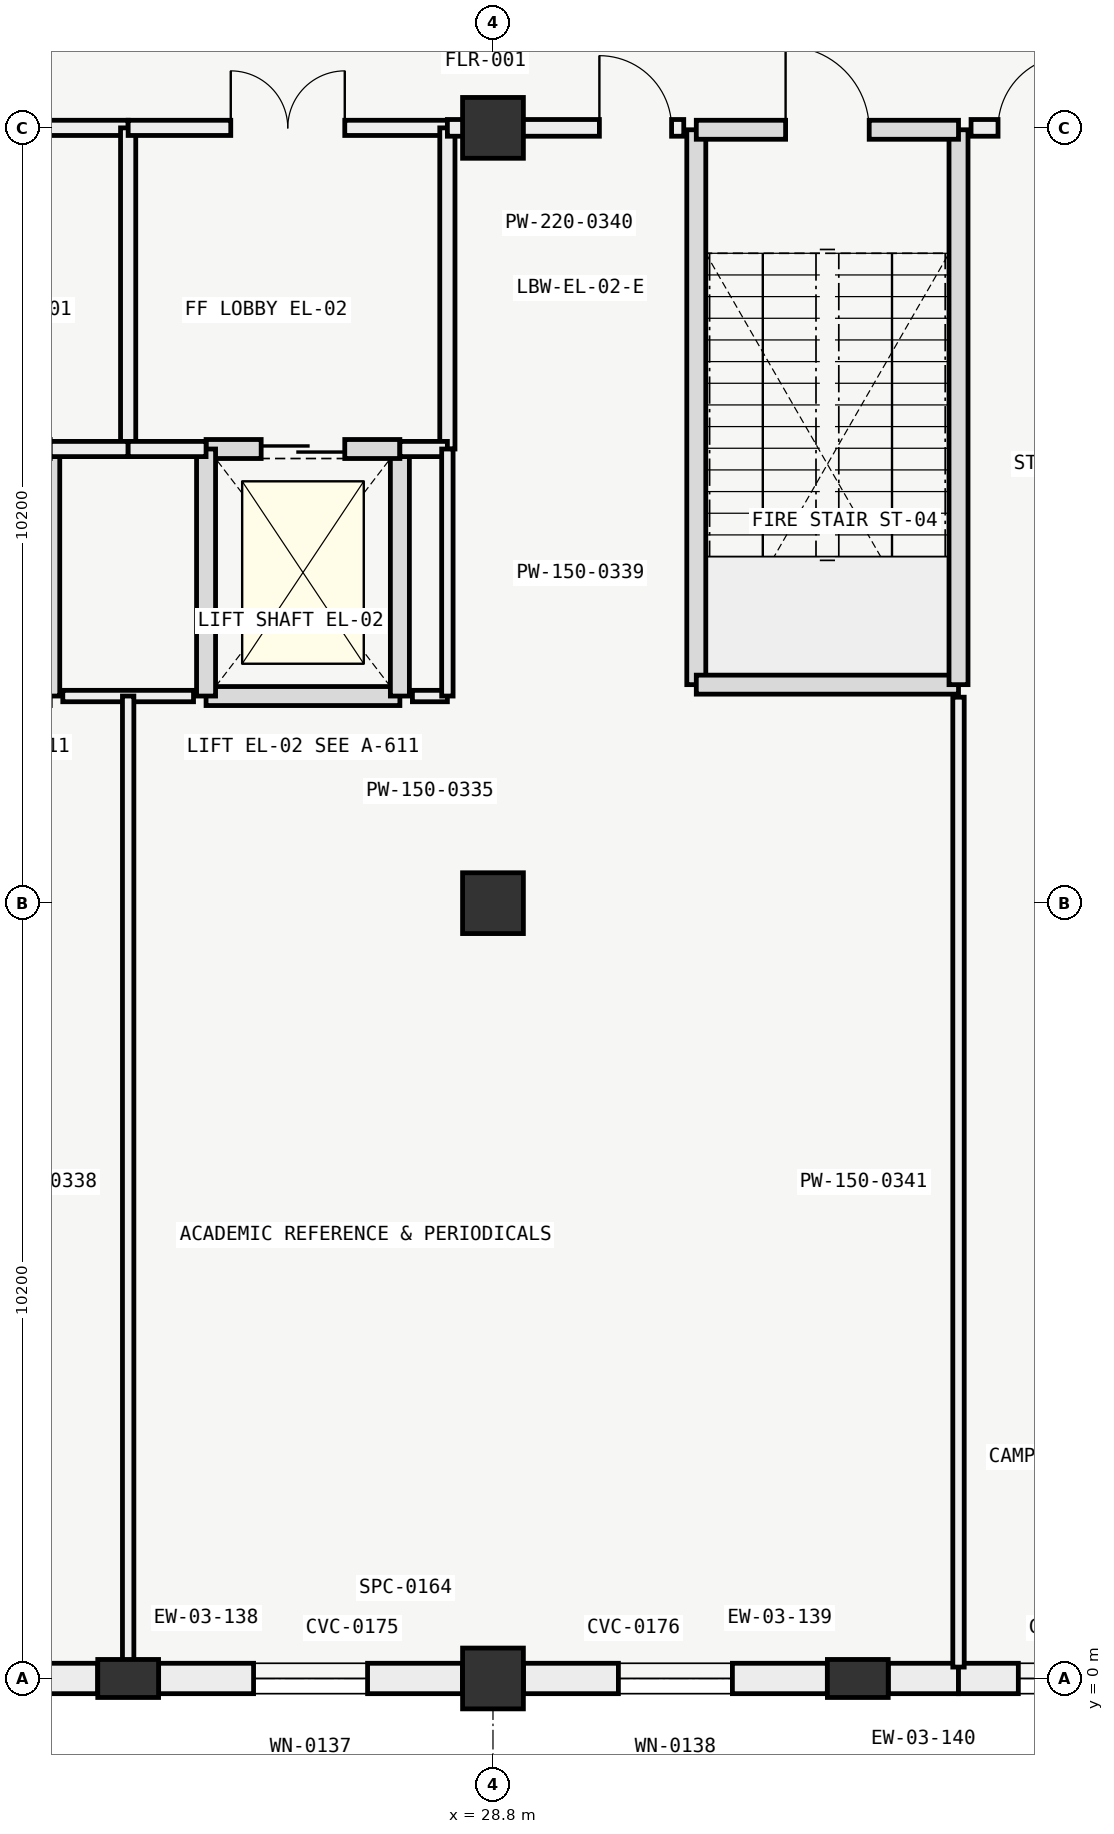
"""IFC4 building model, lengths in metres.
Left out: names, types, materials, properties, quantities, classifications, styles, units other than length and angle.
Written with IfcOpenShell. Run it as: python <this file> out.ifc"""

import sys

from ifc_helpers import new_model, si_unit, direction, frame, frame_2d, origin, origin_2d, place, context, subcontext, project, spatial, rectangle, extrude, element, fill, save


model = new_model("IFC4")
c1 = context("Model", 3, precision=1e-05, world=origin(), true_north=direction((0.0, 1.0)))
c2 = subcontext(c1, "Body", "Model", "MODEL_VIEW")
j1 = project(units=[si_unit("LENGTHUNIT", "METRE"), si_unit("PLANEANGLEUNIT", "RADIAN")], contexts=[c1])
p1 = place(None, origin())
s1 = spatial("IfcSite", under=j1, at=p1, CompositionType="ELEMENT")
p2 = place(p1, origin())
s2 = spatial("IfcBuilding", under=s1, at=p2, CompositionType="ELEMENT")
p3 = place(p2, origin())
s3 = spatial("IfcBuildingStorey", under=s2, at=p3, CompositionType="ELEMENT", Elevation=0.0)
for number, where, z_axis, x_axis in (
    (1, (28.8, 0.0, 0.0), (0.0, 0.0, 1.0), (1.0, 0.0, 0.0)),
    (2, (28.8, 10.2, 0.0), (0.0, 0.0, 1.0), (1.0, 0.0, 0.0)),
    (3, (28.8, 20.4, 0.0), (0.0, 0.0, 1.0), (1.0, 0.0, 0.0)),
):
    element("IfcColumn", number, at=place(p3, frame(where, z_axis=z_axis, x_axis=x_axis)), inside=s3, PredefinedType="COLUMN", context=c2, shape_type="SweptSolid", body=[
        extrude(rectangle(XDim=0.8, YDim=0.8, at=origin_2d()), origin(), (0.0, 0.0, 1.0), 5.4),
    ])
for number, where, z_axis, x_axis in (
    (4, (24.0, 0.0, 0.0), (0.0, 0.0, 1.0), (0.0, 1.0, 0.0)),
    (5, (33.6, 0.0, 0.0), (0.0, 0.0, 1.0), (0.0, 1.0, 0.0)),
):
    element("IfcColumn", number, at=place(p3, frame(where, z_axis=z_axis, x_axis=x_axis)), inside=s3, PredefinedType="PILASTER", context=c2, shape_type="SweptSolid", body=[
        extrude(rectangle(XDim=0.5, YDim=0.8, at=origin_2d()), origin(), (0.0, 0.0, 1.0), 5.4),
    ])
p4 = place(p3, frame((23.599, 0.0, 0.0), z_axis=(0.0, 0.0, 1.0), x_axis=(-1.0, 0.0, 0.0)))
e6 = element("IfcWall", 6, at=p4, inside=s3, PredefinedType="SOLIDWALL", context=c2, shape_type="SweptSolid", body=[
    extrude(rectangle(XDim=3.998, YDim=0.4, at=frame_2d((1.999, 0.0))), origin(), (0.0, 0.0, 1.0), 3.63),
])
p5 = place(p4, frame((1.249, 0.0, 0.8)))
e7 = element("IfcOpeningElement", 7, at=p5, cuts=e6, PredefinedType="OPENING", context=c2, shape_type="SweptSolid", body=[
    extrude(rectangle(XDim=1.5, YDim=2.6, at=frame_2d((0.75, 1.3))), frame((0.0, 0.21, 0.0), z_axis=(0.0, -1.0, 0.0), x_axis=(1.0, 0.0, 0.0)), (0.0, 0.0, 1.0), 0.42),
])
p6 = place(p3, frame((28.399, 0.0, 0.0), z_axis=(0.0, 0.0, 1.0), x_axis=(-1.0, 0.0, 0.0)))
e8 = element("IfcWall", 8, at=p6, inside=s3, PredefinedType="SOLIDWALL", context=c2, shape_type="SweptSolid", body=[
    extrude(rectangle(XDim=3.998, YDim=0.4, at=frame_2d((1.999, 0.0))), origin(), (0.0, 0.0, 1.0), 3.63),
])
p7 = place(p6, frame((1.249, 0.0, 0.8)))
e9 = element("IfcOpeningElement", 9, at=p7, cuts=e8, PredefinedType="OPENING", context=c2, shape_type="SweptSolid", body=[
    extrude(rectangle(XDim=1.5, YDim=2.6, at=frame_2d((0.75, 1.3))), frame((0.0, 0.21, 0.0), z_axis=(0.0, -1.0, 0.0), x_axis=(1.0, 0.0, 0.0)), (0.0, 0.0, 1.0), 0.42),
])
p8 = place(p3, frame((33.199, 0.0, 0.0), z_axis=(0.0, 0.0, 1.0), x_axis=(-1.0, 0.0, 0.0)))
e10 = element("IfcWall", 10, at=p8, inside=s3, PredefinedType="SOLIDWALL", context=c2, shape_type="SweptSolid", body=[
    extrude(rectangle(XDim=3.998, YDim=0.4, at=frame_2d((1.999, 0.0))), origin(), (0.0, 0.0, 1.0), 3.723),
])
p9 = place(p8, frame((1.249, 0.0, 0.8)))
e11 = element("IfcOpeningElement", 11, at=p9, cuts=e10, PredefinedType="OPENING", context=c2, shape_type="SweptSolid", body=[
    extrude(rectangle(XDim=1.5, YDim=2.6, at=frame_2d((0.75, 1.3))), frame((0.0, 0.21, 0.0), z_axis=(0.0, -1.0, 0.0), x_axis=(1.0, 0.0, 0.0)), (0.0, 0.0, 1.0), 0.42),
])
p10 = place(p3, frame((34.925, 0.0, 0.0), z_axis=(0.0, 0.0, 1.0), x_axis=(-1.0, 0.0, 0.0)))
e12 = element("IfcWall", 12, at=p10, inside=s3, PredefinedType="SOLIDWALL", context=c2, shape_type="SweptSolid", body=[
    extrude(rectangle(XDim=0.924, YDim=0.4, at=frame_2d((0.462, 0.0))), origin(), (0.0, 0.0, 1.0), 3.723),
])
p11 = place(p3, frame((37.999, 0.0, 0.0), z_axis=(0.0, 0.0, 1.0), x_axis=(-1.0, 0.0, 0.0)))
e13 = element("IfcWall", 13, at=p11, inside=s3, PredefinedType="SOLIDWALL", context=c2, shape_type="SweptSolid", body=[
    extrude(rectangle(XDim=3.074, YDim=0.4, at=frame_2d((1.537, 0.0))), origin(), (0.0, 0.0, 1.0), 3.723),
])
p12 = place(p11, frame((0.787, 0.0, 0.8)))
e14 = element("IfcOpeningElement", 14, at=p12, cuts=e13, PredefinedType="OPENING", context=c2, shape_type="SweptSolid", body=[
    extrude(rectangle(XDim=1.5, YDim=2.6, at=frame_2d((0.75, 1.3))), frame((0.0, 0.21, 0.0), z_axis=(0.0, -1.0, 0.0), x_axis=(1.0, 0.0, 0.0)), (0.0, 0.0, 1.0), 0.42),
])
p13 = place(p3, frame((31.475, 20.375, 0.0), z_axis=(0.0, 0.0, 1.0), x_axis=(0.0, -1.0, 0.0)))
e15 = element("IfcWall", 15, at=p13, inside=s3, PredefinedType="SOLIDWALL", context=c2, shape_type="SweptSolid", body=[
    extrude(rectangle(XDim=7.3, YDim=0.25, at=frame_2d((3.65, 0.0))), origin(), (0.0, 0.0, 1.0), 5.12),
])
p14 = place(p3, frame((31.475, 13.075, 0.0), z_axis=(0.0, 0.0, 1.0), x_axis=(1.0, 0.0, 0.0)))
e16 = element("IfcWall", 16, at=p14, inside=s3, PredefinedType="SOLIDWALL", context=c2, shape_type="SweptSolid", body=[
    extrude(rectangle(XDim=3.45, YDim=0.25, at=frame_2d((1.725, 0.0))), origin(), (0.0, 0.0, 1.0), 5.12),
])
p15 = place(p3, frame((34.925, 13.075, 0.0), z_axis=(0.0, 0.0, 1.0), x_axis=(0.0, 1.0, 0.0)))
e17 = element("IfcWall", 17, at=p15, inside=s3, PredefinedType="SOLIDWALL", context=c2, shape_type="SweptSolid", body=[
    extrude(rectangle(XDim=7.3, YDim=0.25, at=frame_2d((3.65, 0.0))), origin(), (0.0, 0.0, 1.0), 5.12),
])
p16 = place(p3, frame((31.475, 20.375, 0.0), z_axis=(0.0, 0.0, 1.0), x_axis=(1.0, 0.0, 0.0)))
e18 = element("IfcWall", 18, at=p16, inside=s3, PredefinedType="SOLIDWALL", context=c2, shape_type="SweptSolid", body=[
    extrude(rectangle(XDim=3.45, YDim=0.25, at=frame_2d((1.725, 0.0))), origin(), (0.0, 0.0, 1.0), 5.12),
])
p17 = place(p16, frame((1.175, 0.0, 0.0)))
e19 = element("IfcOpeningElement", 19, at=p17, cuts=e18, PredefinedType="OPENING", context=c2, shape_type="SweptSolid", body=[
    extrude(rectangle(XDim=1.1, YDim=2.2, at=frame_2d((0.55, 1.1))), frame((0.0, 0.135, 0.0), z_axis=(0.0, -1.0, 0.0), x_axis=(1.0, 0.0, 0.0)), (0.0, 0.0, 1.0), 0.27),
])
p18 = place(p3, frame((22.975, 12.925, 0.0), z_axis=(0.0, 0.0, 1.0), x_axis=(0.0, 1.0, 0.0)))
e20 = element("IfcWall", 20, at=p18, inside=s3, PredefinedType="SOLIDWALL", context=c2, shape_type="SweptSolid", body=[
    extrude(rectangle(XDim=3.25, YDim=0.25, at=frame_2d((1.625, 0.0))), origin(), (0.0, 0.0, 1.0), 5.12),
])
p19 = place(p3, frame((19.8, 20.4, 0.0), z_axis=(0.0, 0.0, 1.0), x_axis=(1.0, 0.0, 0.0)))
e21 = element("IfcWall", 21, at=p19, inside=s3, PredefinedType="PARTITIONING", context=c2, shape_type="SweptSolid", body=[
    extrude(rectangle(XDim=4.2, YDim=0.2, at=frame_2d((2.1, 0.0))), origin(), (0.0, 0.0, 1.0), 4.4),
])
p20 = place(p19, frame((1.35, 0.0, 0.0)))
e22 = element("IfcOpeningElement", 22, at=p20, cuts=e21, PredefinedType="OPENING", context=c2, shape_type="SweptSolid", body=[
    extrude(rectangle(XDim=1.5, YDim=2.2, at=frame_2d((0.75, 1.1))), frame((0.0, 0.11, 0.0), z_axis=(0.0, -1.0, 0.0), x_axis=(1.0, 0.0, 0.0)), (0.0, 0.0, 1.0), 0.22),
])
p21 = place(p3, frame((24.0, 16.175, 0.0), z_axis=(0.0, 0.0, 1.0), x_axis=(0.0, 1.0, 0.0)))
e23 = element("IfcWall", 23, at=p21, inside=s3, PredefinedType="PARTITIONING", context=c2, shape_type="SweptSolid", body=[
    extrude(rectangle(XDim=4.225, YDim=0.2, at=frame_2d((2.112, 0.0))), origin(), (0.0, 0.0, 1.0), 4.4),
])
p22 = place(p3, frame((22.975, 16.175, 0.0), z_axis=(0.0, 0.0, 1.0), x_axis=(1.0, 0.0, 0.0)))
e24 = element("IfcWall", 24, at=p22, inside=s3, PredefinedType="PARTITIONING", context=c2, shape_type="SweptSolid", body=[
    extrude(rectangle(XDim=1.025, YDim=0.2, at=frame_2d((0.512, 0.0))), origin(), (0.0, 0.0, 1.0), 4.75),
])
p23 = place(p3, frame((25.025, 12.925, 0.0), z_axis=(0.0, 0.0, 1.0), x_axis=(1.0, 0.0, 0.0)))
e25 = element("IfcWall", 25, at=p23, inside=s3, PredefinedType="SOLIDWALL", context=c2, shape_type="SweptSolid", body=[
    extrude(rectangle(XDim=2.55, YDim=0.25, at=frame_2d((1.275, 0.0))), origin(), (0.0, 0.0, 1.0), 5.12),
])
p24 = place(p3, frame((27.575, 12.925, 0.0), z_axis=(0.0, 0.0, 1.0), x_axis=(0.0, 1.0, 0.0)))
e26 = element("IfcWall", 26, at=p24, inside=s3, PredefinedType="SOLIDWALL", context=c2, shape_type="SweptSolid", body=[
    extrude(rectangle(XDim=3.25, YDim=0.25, at=frame_2d((1.625, 0.0))), origin(), (0.0, 0.0, 1.0), 5.12),
])
p25 = place(p3, frame((27.575, 16.175, 0.0), z_axis=(0.0, 0.0, 1.0), x_axis=(-1.0, 0.0, 0.0)))
e27 = element("IfcWall", 27, at=p25, inside=s3, PredefinedType="SOLIDWALL", context=c2, shape_type="SweptSolid", body=[
    extrude(rectangle(XDim=2.55, YDim=0.25, at=frame_2d((1.275, 0.0))), origin(), (0.0, 0.0, 1.0), 5.12),
])
p26 = place(p25, frame((0.725, 0.0, 0.0)))
e28 = element("IfcOpeningElement", 28, at=p26, cuts=e27, PredefinedType="OPENING", context=c2, shape_type="SweptSolid", body=[
    extrude(rectangle(XDim=1.1, YDim=2.1, at=frame_2d((0.55, 1.05))), frame((0.0, 0.135, 0.0), z_axis=(0.0, -1.0, 0.0), x_axis=(1.0, 0.0, 0.0)), (0.0, 0.0, 1.0), 0.27),
])
p27 = place(p3, frame((25.025, 16.175, 0.0), z_axis=(0.0, 0.0, 1.0), x_axis=(0.0, -1.0, 0.0)))
e29 = element("IfcWall", 29, at=p27, inside=s3, PredefinedType="SOLIDWALL", context=c2, shape_type="SweptSolid", body=[
    extrude(rectangle(XDim=3.25, YDim=0.25, at=frame_2d((1.625, 0.0))), origin(), (0.0, 0.0, 1.0), 5.12),
])
p28 = place(p3, frame((24.0, 20.4, 0.0), z_axis=(0.0, 0.0, 1.0), x_axis=(1.0, 0.0, 0.0)))
e30 = element("IfcWall", 30, at=p28, inside=s3, PredefinedType="PARTITIONING", context=c2, shape_type="SweptSolid", body=[
    extrude(rectangle(XDim=4.2, YDim=0.2, at=frame_2d((2.1, 0.0))), origin(), (0.0, 0.0, 1.0), 4.4),
])
p29 = place(p28, frame((1.35, 0.0, 0.0)))
e31 = element("IfcOpeningElement", 31, at=p29, cuts=e30, PredefinedType="OPENING", context=c2, shape_type="SweptSolid", body=[
    extrude(rectangle(XDim=1.5, YDim=2.2, at=frame_2d((0.75, 1.1))), frame((0.0, 0.11, 0.0), z_axis=(0.0, -1.0, 0.0), x_axis=(1.0, 0.0, 0.0)), (0.0, 0.0, 1.0), 0.22),
])
p30 = place(p3, frame((28.2, 16.175, 0.0), z_axis=(0.0, 0.0, 1.0), x_axis=(0.0, 1.0, 0.0)))
e32 = element("IfcWall", 32, at=p30, inside=s3, PredefinedType="PARTITIONING", context=c2, shape_type="SweptSolid", body=[
    extrude(rectangle(XDim=4.225, YDim=0.2, at=frame_2d((2.112, 0.0))), origin(), (0.0, 0.0, 1.0), 4.4),
])
p31 = place(p3, frame((24.0, 16.175, 0.0), z_axis=(0.0, 0.0, 1.0), x_axis=(1.0, 0.0, 0.0)))
e33 = element("IfcWall", 33, at=p31, inside=s3, PredefinedType="PARTITIONING", context=c2, shape_type="SweptSolid", body=[
    extrude(rectangle(XDim=1.025, YDim=0.2, at=frame_2d((0.512, 0.0))), origin(), (0.0, 0.0, 1.0), 4.75),
])
p32 = place(p3, frame((27.575, 16.175, 0.0), z_axis=(0.0, 0.0, 1.0), x_axis=(1.0, 0.0, 0.0)))
e34 = element("IfcWall", 34, at=p32, inside=s3, PredefinedType="PARTITIONING", context=c2, shape_type="SweptSolid", body=[
    extrude(rectangle(XDim=0.625, YDim=0.2, at=frame_2d((0.312, 0.0))), origin(), (0.0, 0.0, 1.0), 4.75),
])
p33 = place(p3, frame((23.14, 12.925, 0.0), z_axis=(0.0, 0.0, 1.0), x_axis=(1.0, 0.0, 0.0)))
e35 = element("IfcWall", 35, at=p33, inside=s3, PredefinedType="PARTITIONING", context=c2, shape_type="SweptSolid", body=[
    extrude(rectangle(XDim=1.72, YDim=0.15, at=frame_2d((0.86, 0.0))), origin(), (0.0, 0.0, 1.0), 5.05),
])
p34 = place(p3, frame((27.74, 12.925, 0.0), z_axis=(0.0, 0.0, 1.0), x_axis=(1.0, 0.0, 0.0)))
e36 = element("IfcWall", 36, at=p34, inside=s3, PredefinedType="PARTITIONING", context=c2, shape_type="SweptSolid", body=[
    extrude(rectangle(XDim=0.46, YDim=0.15, at=frame_2d((0.23, 0.0))), origin(), (0.0, 0.0, 1.0), 5.05),
])
p35 = place(p3, frame((24.0, 0.15, 0.0), z_axis=(0.0, 0.0, 1.0), x_axis=(0.0, 1.0, 0.0)))
e37 = element("IfcWall", 37, at=p35, inside=s3, PredefinedType="PARTITIONING", context=c2, shape_type="SweptSolid", body=[
    extrude(rectangle(XDim=12.775, YDim=0.15, at=frame_2d((6.388, 0.0))), origin(), (0.0, 0.0, 1.0), 4.4),
])
p36 = place(p3, frame((28.2, 12.925, 0.0), z_axis=(0.0, 0.0, 1.0), x_axis=(0.0, 1.0, 0.0)))
e38 = element("IfcWall", 38, at=p36, inside=s3, PredefinedType="PARTITIONING", context=c2, shape_type="SweptSolid", body=[
    extrude(rectangle(XDim=3.25, YDim=0.15, at=frame_2d((1.625, 0.0))), origin(), (0.0, 0.0, 1.0), 5.05),
])
p37 = place(p3, frame((28.2, 20.4, 0.0), z_axis=(0.0, 0.0, 1.0), x_axis=(1.0, 0.0, 0.0)))
e39 = element("IfcWall", 39, at=p37, inside=s3, PredefinedType="PARTITIONING", context=c2, shape_type="SweptSolid", body=[
    extrude(rectangle(XDim=3.11, YDim=0.22, at=frame_2d((1.555, 0.0))), origin(), (0.0, 0.0, 1.0), 4.4),
])
p38 = place(p37, frame((2.0, 0.0, 0.0)))
e40 = element("IfcOpeningElement", 40, at=p38, cuts=e39, PredefinedType="OPENING", context=c2, shape_type="SweptSolid", body=[
    extrude(rectangle(XDim=0.95, YDim=2.1, at=frame_2d((0.475, 1.05))), frame((0.0, 0.12, 0.0), z_axis=(0.0, -1.0, 0.0), x_axis=(1.0, 0.0, 0.0)), (0.0, 0.0, 1.0), 0.24),
])
p39 = place(p3, frame((34.925, 0.15, 0.0), z_axis=(0.0, 0.0, 1.0), x_axis=(0.0, 1.0, 0.0)))
e41 = element("IfcWall", 41, at=p39, inside=s3, PredefinedType="PARTITIONING", context=c2, shape_type="SweptSolid", body=[
    extrude(rectangle(XDim=12.76, YDim=0.15, at=frame_2d((6.38, 0.0))), origin(), (0.0, 0.0, 1.0), 4.4),
])
p40 = place(p3, frame((35.09, 20.4, 0.0), z_axis=(0.0, 0.0, 1.0), x_axis=(1.0, 0.0, 0.0)))
e42 = element("IfcWall", 42, at=p40, inside=s3, PredefinedType="PARTITIONING", context=c2, shape_type="SweptSolid", body=[
    extrude(rectangle(XDim=12.76, YDim=0.22, at=frame_2d((6.38, 0.0))), origin(), (0.0, 0.0, 1.0), 4.4),
])
p41 = place(p40, frame((0.355, 0.0, 0.0)))
e43 = element("IfcOpeningElement", 43, at=p41, cuts=e42, PredefinedType="OPENING", context=c2, shape_type="SweptSolid", body=[
    extrude(rectangle(XDim=0.95, YDim=2.1, at=frame_2d((0.475, 1.05))), frame((0.0, 0.12, 0.0), z_axis=(0.0, -1.0, 0.0), x_axis=(1.0, 0.0, 0.0)), (0.0, 0.0, 1.0), 0.24),
])
p42 = place(p40, frame((10.66, 0.0, 0.0)))
e44 = element("IfcOpeningElement", 44, at=p42, cuts=e42, PredefinedType="OPENING", context=c2, shape_type="SweptSolid", body=[
    extrude(rectangle(XDim=0.95, YDim=2.1, at=frame_2d((0.475, 1.05))), frame((0.0, 0.12, 0.0), z_axis=(0.0, -1.0, 0.0), x_axis=(1.0, 0.0, 0.0)), (0.0, 0.0, 1.0), 0.24),
])
p43 = place(p7, origin())
e45 = element("IfcWindow", 45, at=p43, inside=s3, PartitioningType="SINGLE_PANEL", PredefinedType="WINDOW", context=c2, shape_type="SweptSolid", body=[
    extrude(rectangle(XDim=1.5, YDim=2.6, at=frame_2d((0.75, 1.3))), frame((0.0, 0.03, 0.0), z_axis=(0.0, -1.0, 0.0), x_axis=(1.0, 0.0, 0.0)), (0.0, 0.0, 1.0), 0.06),
])
fill(e9, e45)
p44 = place(p9, origin())
e46 = element("IfcWindow", 46, at=p44, inside=s3, PartitioningType="SINGLE_PANEL", PredefinedType="WINDOW", context=c2, shape_type="SweptSolid", body=[
    extrude(rectangle(XDim=1.5, YDim=2.6, at=frame_2d((0.75, 1.3))), frame((0.0, 0.03, 0.0), z_axis=(0.0, -1.0, 0.0), x_axis=(1.0, 0.0, 0.0)), (0.0, 0.0, 1.0), 0.06),
])
fill(e11, e46)
p45 = place(p12, origin())
e47 = element("IfcWindow", 47, at=p45, inside=s3, PartitioningType="SINGLE_PANEL", PredefinedType="WINDOW", context=c2, shape_type="SweptSolid", body=[
    extrude(rectangle(XDim=1.5, YDim=2.6, at=frame_2d((0.75, 1.3))), frame((0.0, 0.03, 0.0), z_axis=(0.0, -1.0, 0.0), x_axis=(1.0, 0.0, 0.0)), (0.0, 0.0, 1.0), 0.06),
])
fill(e14, e47)
p46 = place(p17, origin())
e48 = element("IfcDoor", 48, at=p46, inside=s3, OperationType="SINGLE_SWING_LEFT", PredefinedType="DOOR", context=c2, shape_type="SweptSolid", body=[
    extrude(rectangle(XDim=1.1, YDim=2.2, at=frame_2d((0.55, 1.1))), frame((0.0, 0.025, 0.0), z_axis=(0.0, -1.0, 0.0), x_axis=(1.0, 0.0, 0.0)), (0.0, 0.0, 1.0), 0.05),
])
fill(e19, e48)
p47 = place(p26, origin())
e49 = element("IfcDoor", 49, at=p47, inside=s3, OperationType="SLIDING_TO_LEFT", PredefinedType="DOOR", context=c2, shape_type="SweptSolid", body=[
    extrude(rectangle(XDim=1.1, YDim=2.1, at=frame_2d((0.55, 1.05))), frame((0.0, 0.025, 0.0), z_axis=(0.0, -1.0, 0.0), x_axis=(1.0, 0.0, 0.0)), (0.0, 0.0, 1.0), 0.05),
])
fill(e28, e49)
p48 = place(p29, origin())
e50 = element("IfcDoor", 50, at=p48, inside=s3, OperationType="SINGLE_SWING_LEFT", PredefinedType="DOOR", context=c2, shape_type="SweptSolid", body=[
    extrude(rectangle(XDim=1.5, YDim=2.2, at=frame_2d((0.75, 1.1))), frame((0.0, 0.025, 0.0), z_axis=(0.0, -1.0, 0.0), x_axis=(1.0, 0.0, 0.0)), (0.0, 0.0, 1.0), 0.05),
])
fill(e31, e50)
p49 = place(p38, origin())
e51 = element("IfcDoor", 51, at=p49, inside=s3, OperationType="SINGLE_SWING_LEFT", PredefinedType="DOOR", context=c2, shape_type="SweptSolid", body=[
    extrude(rectangle(XDim=0.95, YDim=2.1, at=frame_2d((0.475, 1.05))), frame((0.0, 0.025, 0.0), z_axis=(0.0, -1.0, 0.0), x_axis=(1.0, 0.0, 0.0)), (0.0, 0.0, 1.0), 0.05),
])
fill(e40, e51)
p50 = place(p41, origin())
e52 = element("IfcDoor", 52, at=p50, inside=s3, OperationType="SINGLE_SWING_RIGHT", PredefinedType="DOOR", context=c2, shape_type="SweptSolid", body=[
    extrude(rectangle(XDim=0.95, YDim=2.1, at=frame_2d((0.475, 1.05))), frame((0.0, 0.025, 0.0), z_axis=(0.0, -1.0, 0.0), x_axis=(1.0, 0.0, 0.0)), (0.0, 0.0, 1.0), 0.05),
])
fill(e43, e52)
save(model, sys.argv[1])
